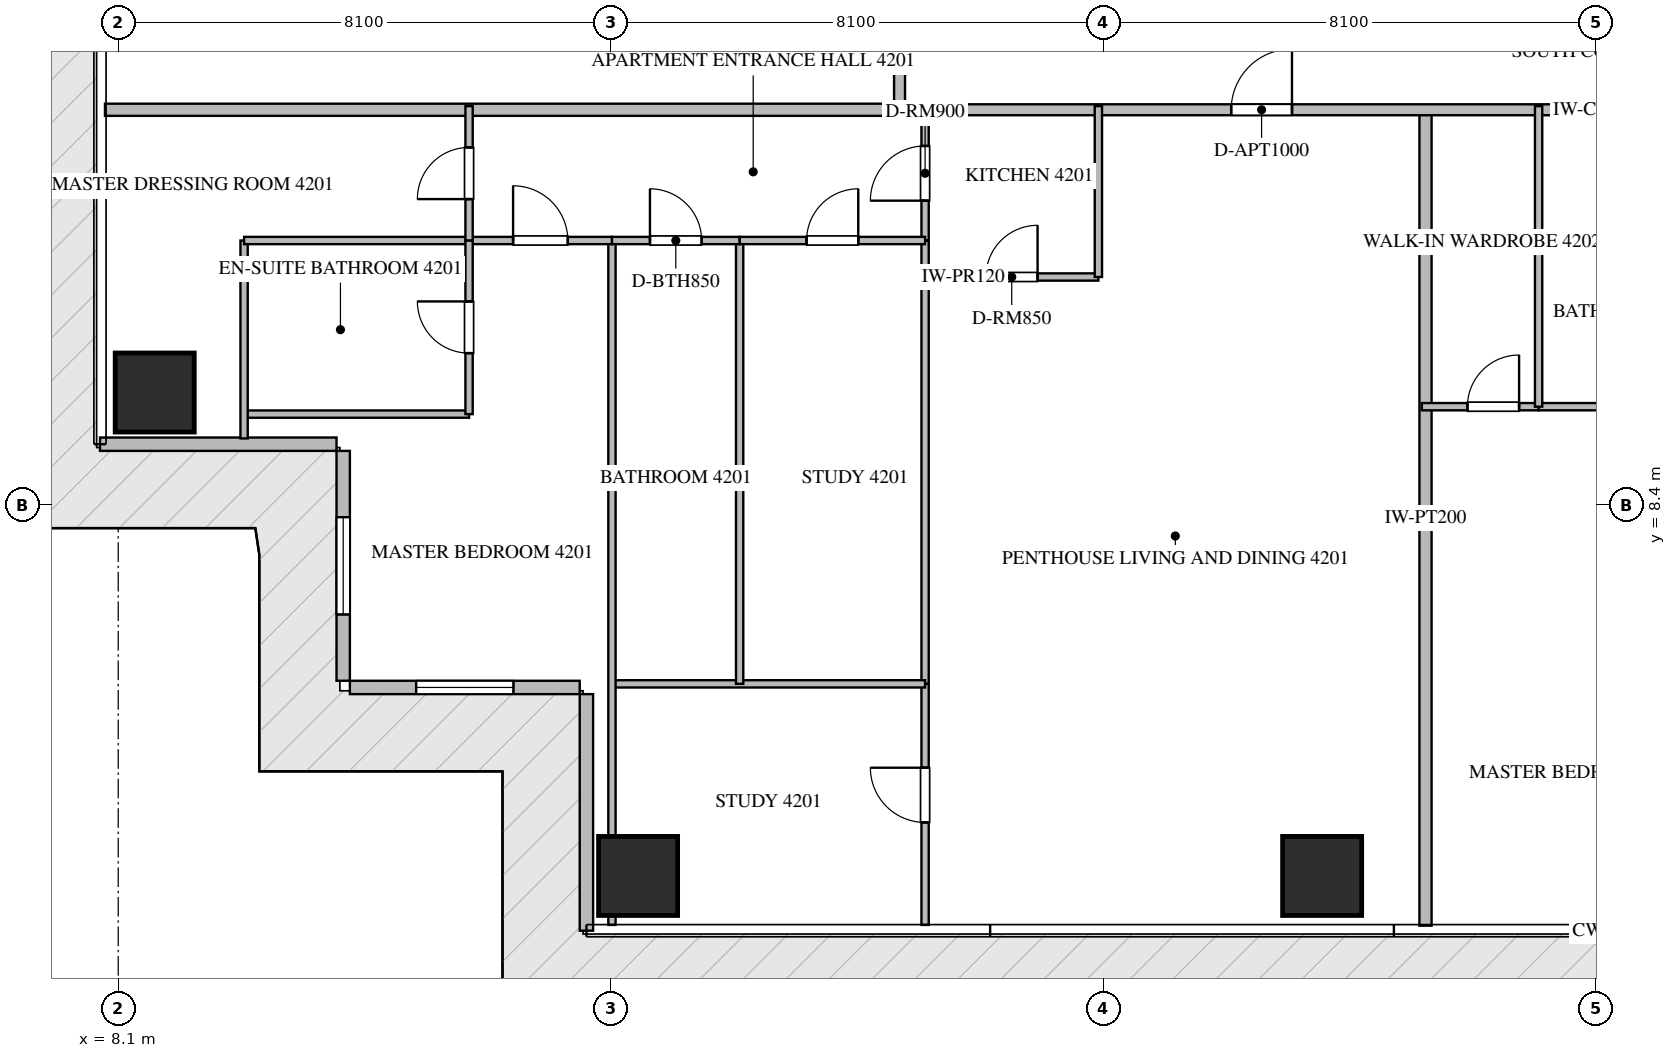
"""IFC4 building model, lengths in metres.
Left out: names, types, materials, properties, quantities, classifications, styles, units other than length and angle.
Written with IfcOpenShell. Run it as: python <this file> out.ifc"""

import sys

from ifc_helpers import new_model, si_unit, direction, frame, frame_2d, origin, origin_2d, place, context, subcontext, project, spatial, rectangle, extrude, source, transform, mapped, element, fill, save


model = new_model("IFC4")
c1 = context("Model", 3, precision=1e-05, world=origin(), true_north=direction((0.0, 1.0)))
c2 = subcontext(c1, "Body", "Model", "MODEL_VIEW")
j1 = project(units=[si_unit("LENGTHUNIT", "METRE"), si_unit("PLANEANGLEUNIT", "RADIAN")], contexts=[c1])
p1 = place(None, origin())
s1 = spatial("IfcSite", under=j1, at=p1, CompositionType="ELEMENT")
p2 = place(p1, origin())
s2 = spatial("IfcBuilding", under=s1, at=p2, CompositionType="ELEMENT")
p3 = place(p2, frame((0.0, 0.0, 168.9)))
s3 = spatial("IfcBuildingStorey", under=s2, at=p3, CompositionType="ELEMENT", Elevation=168.9)
m1 = source(origin(), c2, "Body", "SweptSolid", [
    extrude(rectangle(XDim=1.3, YDim=1.3, at=origin_2d()), origin(), (0.0, 0.0, 1.0), 3.75),
])
for number, where, z_axis, x_axis in (
    (1, (16.65, 2.3, -0.26), (0.0, 0.0, 1.0), (1.0, 0.0, 0.0)),
    (2, (27.9, 2.3, -0.26), (0.0, 0.0, 1.0), (1.0, 0.0, 0.0)),
    (3, (8.7, 10.25, -0.26), (0.0, 0.0, 1.0), (1.0, 0.0, 0.0)),
):
    element("IfcColumn", number, at=place(p3, frame(where, z_axis=z_axis, x_axis=x_axis)), inside=s3, PredefinedType="COLUMN", context=c2, shape_type="MappedRepresentation", body=[
        mapped(m1, transform((0.0, 0.0, 0.0), scale=1.0)),
    ])
p4 = place(p3, frame((7.8, 9.4, 0.0), z_axis=(0.0, 0.0, 1.0), x_axis=(1.0, 0.0, 0.0)))
e4 = element("IfcWall", 4, at=p4, inside=s3, PredefinedType="ELEMENTEDWALL", context=c2, shape_type="SweptSolid", body=[
    extrude(rectangle(XDim=3.89, YDim=0.22, at=frame_2d((1.945, 0.0))), origin(), (0.0, 0.0, 1.0), 3.475),
])
p5 = place(p3, frame((11.8, 9.29, 0.0), z_axis=(0.0, 0.0, 1.0), x_axis=(0.0, -1.0, 0.0)))
e5 = element("IfcWall", 5, at=p5, inside=s3, PredefinedType="ELEMENTEDWALL", context=c2, shape_type="SweptSolid", body=[
    extrude(rectangle(XDim=3.78, YDim=0.22, at=frame_2d((1.89, 0.0))), origin(), (0.0, 0.0, 1.0), 3.475),
])
p6 = place(p5, frame((1.09, 0.0, 0.65)))
e6 = element("IfcOpeningElement", 6, at=p6, cuts=e5, PredefinedType="OPENING", context=c2, shape_type="SweptSolid", body=[
    extrude(rectangle(XDim=1.6, YDim=2.1, at=frame_2d((0.8, 1.05))), frame((0.0, 0.12, 0.0), z_axis=(0.0, -1.0, 0.0), x_axis=(1.0, 0.0, 0.0)), (0.0, 0.0, 1.0), 0.24),
])
p7 = place(p3, frame((11.91, 5.4, 0.0), z_axis=(0.0, 0.0, 1.0), x_axis=(1.0, 0.0, 0.0)))
e7 = element("IfcWall", 7, at=p7, inside=s3, PredefinedType="ELEMENTEDWALL", context=c2, shape_type="SweptSolid", body=[
    extrude(rectangle(XDim=3.78, YDim=0.22, at=frame_2d((1.89, 0.0))), origin(), (0.0, 0.0, 1.0), 3.475),
])
p8 = place(p7, frame((1.09, 0.0, 0.65)))
e8 = element("IfcOpeningElement", 8, at=p8, cuts=e7, PredefinedType="OPENING", context=c2, shape_type="SweptSolid", body=[
    extrude(rectangle(XDim=1.6, YDim=2.1, at=frame_2d((0.8, 1.05))), frame((0.0, 0.12, 0.0), z_axis=(0.0, -1.0, 0.0), x_axis=(1.0, 0.0, 0.0)), (0.0, 0.0, 1.0), 0.24),
])
p9 = place(p3, frame((15.8, 5.29, 0.0), z_axis=(0.0, 0.0, 1.0), x_axis=(0.0, -1.0, 0.0)))
e9 = element("IfcWall", 9, at=p9, inside=s3, PredefinedType="ELEMENTEDWALL", context=c2, shape_type="SweptSolid", body=[
    extrude(rectangle(XDim=3.89, YDim=0.22, at=frame_2d((1.945, 0.0))), origin(), (0.0, 0.0, 1.0), 3.475),
])
p10 = place(p3, frame((29.6, 1.482, 0.0), z_axis=(0.0, 0.0, 1.0), x_axis=(0.0, 1.0, 0.0)))
e10 = element("IfcWall", 10, at=p10, inside=s3, PredefinedType="PARTITIONING", context=c2, shape_type="SweptSolid", body=[
    extrude(rectangle(XDim=13.418, YDim=0.2, at=frame_2d((6.709, 0.0))), origin(), (0.0, 0.0, 1.0), 3.49),
])
p11 = place(p3, frame((7.882, 14.9, 0.0), z_axis=(0.0, 0.0, 1.0), x_axis=(1.0, 0.0, 0.0)))
e11 = element("IfcWall", 11, at=p11, inside=s3, PredefinedType="PARTITIONING", context=c2, shape_type="SweptSolid", body=[
    extrude(rectangle(XDim=13.068, YDim=0.2, at=frame_2d((6.534, 0.0))), origin(), (0.0, 0.0, 1.0), 3.49),
])
p12 = place(p3, frame((20.952, 14.9, 0.0), z_axis=(0.0, 0.0, 1.0), x_axis=(1.0, 0.0, 0.0)))
e12 = element("IfcWall", 12, at=p12, inside=s3, PredefinedType="PARTITIONING", context=c2, shape_type="SweptSolid", body=[
    extrude(rectangle(XDim=22.896, YDim=0.18, at=frame_2d((11.448, 0.0))), origin(), (0.0, 0.0, 1.0), 3.49),
])
p13 = place(p12, frame((5.452, 0.0, 0.0)))
e13 = element("IfcOpeningElement", 13, at=p13, cuts=e12, PredefinedType="OPENING", context=c2, shape_type="SweptSolid", body=[
    extrude(rectangle(XDim=1.0, YDim=2.15, at=frame_2d((0.5, 1.075))), frame((0.0, 0.1, 0.0), z_axis=(0.0, -1.0, 0.0), x_axis=(1.0, 0.0, 0.0)), (0.0, 0.0, 1.0), 0.2),
])
p14 = place(p12, frame((19.378, 0.0, 0.0)))
e14 = element("IfcOpeningElement", 14, at=p14, cuts=e12, PredefinedType="OPENING", context=c2, shape_type="SweptSolid", body=[
    extrude(rectangle(XDim=1.0, YDim=2.15, at=frame_2d((0.5, 1.075))), frame((0.0, 0.1, 0.0), z_axis=(0.0, -1.0, 0.0), x_axis=(1.0, 0.0, 0.0)), (0.0, 0.0, 1.0), 0.2),
])
p15 = place(p3, frame((20.95, 14.9, 0.0), z_axis=(0.0, 0.0, 1.0), x_axis=(0.0, 1.0, 0.0)))
e15 = element("IfcWall", 15, at=p15, inside=s3, PredefinedType="PARTITIONING", context=c2, shape_type="SweptSolid", body=[
    extrude(rectangle(XDim=18.7, YDim=0.18, at=frame_2d((9.35, 0.0))), origin(), (0.0, 0.0, 1.0), 3.49),
])
p16 = place(p15, frame((1.805, 0.0, 0.0)))
e16 = element("IfcOpeningElement", 16, at=p16, cuts=e15, PredefinedType="OPENING", context=c2, shape_type="SweptSolid", body=[
    extrude(rectangle(XDim=1.0, YDim=2.15, at=frame_2d((0.5, 1.075))), frame((0.0, 0.1, 0.0), z_axis=(0.0, -1.0, 0.0), x_axis=(1.0, 0.0, 0.0)), (0.0, 0.0, 1.0), 0.2),
])
p17 = place(p3, frame((21.37, 12.15, 0.0), z_axis=(0.0, 0.0, 1.0), x_axis=(1.0, 0.0, 0.0)))
e17 = element("IfcWall", 17, at=p17, inside=s3, PredefinedType="PARTITIONING", context=c2, shape_type="SweptSolid", body=[
    extrude(rectangle(XDim=2.85, YDim=0.12, at=frame_2d((1.425, 0.0))), origin(), (0.0, 0.0, 1.0), 3.49),
])
p18 = place(p17, frame((1.0, 0.0, 0.0)))
e18 = element("IfcOpeningElement", 18, at=p18, cuts=e17, PredefinedType="OPENING", context=c2, shape_type="SweptSolid", body=[
    extrude(rectangle(XDim=0.85, YDim=2.1, at=frame_2d((0.425, 1.05))), frame((0.0, 0.07, 0.0), z_axis=(0.0, -1.0, 0.0), x_axis=(1.0, 0.0, 0.0)), (0.0, 0.0, 1.0), 0.14),
])
p19 = place(p3, frame((24.22, 12.15, 0.0), z_axis=(0.0, 0.0, 1.0), x_axis=(0.0, 1.0, 0.0)))
e19 = element("IfcWall", 19, at=p19, inside=s3, PredefinedType="PARTITIONING", context=c2, shape_type="SweptSolid", body=[
    extrude(rectangle(XDim=2.81, YDim=0.12, at=frame_2d((1.405, 0.0))), origin(), (0.0, 0.0, 1.0), 3.49),
])
p20 = place(p3, frame((21.37, 12.75, 0.0), z_axis=(0.0, 0.0, 1.0), x_axis=(0.0, 1.0, 0.0)))
e20 = element("IfcWall", 20, at=p20, inside=s3, PredefinedType="PARTITIONING", context=c2, shape_type="SweptSolid", body=[
    extrude(rectangle(XDim=2.21, YDim=0.12, at=frame_2d((1.105, 0.0))), origin(), (0.0, 0.0, 1.0), 3.49),
])
p21 = place(p20, frame((0.655, 0.0, 0.0)))
e21 = element("IfcOpeningElement", 21, at=p21, cuts=e20, PredefinedType="OPENING", context=c2, shape_type="SweptSolid", body=[
    extrude(rectangle(XDim=0.9, YDim=2.1, at=frame_2d((0.45, 1.05))), frame((0.0, 0.07, 0.0), z_axis=(0.0, -1.0, 0.0), x_axis=(1.0, 0.0, 0.0)), (0.0, 0.0, 1.0), 0.14),
])
p22 = place(p3, frame((21.37, 1.495, 0.0), z_axis=(0.0, 0.0, 1.0), x_axis=(0.0, 1.0, 0.0)))
e22 = element("IfcWall", 22, at=p22, inside=s3, PredefinedType="PARTITIONING", context=c2, shape_type="SweptSolid", body=[
    extrude(rectangle(XDim=3.964, YDim=0.12, at=frame_2d((1.982, 0.0))), origin(), (0.0, 0.0, 1.0), 3.49),
])
p23 = place(p22, frame((1.685, 0.0, 0.0)))
e23 = element("IfcOpeningElement", 23, at=p23, cuts=e22, PredefinedType="OPENING", context=c2, shape_type="SweptSolid", body=[
    extrude(rectangle(XDim=0.9, YDim=2.1, at=frame_2d((0.45, 1.05))), frame((0.0, 0.07, 0.0), z_axis=(0.0, -1.0, 0.0), x_axis=(1.0, 0.0, 0.0)), (0.0, 0.0, 1.0), 0.14),
])
p24 = place(p3, frame((21.37, 5.461, 0.0), z_axis=(0.0, 0.0, 1.0), x_axis=(0.0, 1.0, 0.0)))
e24 = element("IfcWall", 24, at=p24, inside=s3, PredefinedType="PARTITIONING", context=c2, shape_type="SweptSolid", body=[
    extrude(rectangle(XDim=7.287, YDim=0.12, at=frame_2d((3.644, 0.0))), origin(), (0.0, 0.0, 1.0), 3.49),
])
p25 = place(p3, frame((16.22, 5.459, 0.0), z_axis=(0.0, 0.0, 1.0), x_axis=(1.0, 0.0, 0.0)))
e25 = element("IfcWall", 25, at=p25, inside=s3, PredefinedType="PARTITIONING", context=c2, shape_type="SweptSolid", body=[
    extrude(rectangle(XDim=5.15, YDim=0.12, at=frame_2d((2.575, 0.0))), origin(), (0.0, 0.0, 1.0), 3.49),
])
p26 = place(p3, frame((16.22, 1.495, 0.0), z_axis=(0.0, 0.0, 1.0), x_axis=(0.0, 1.0, 0.0)))
e26 = element("IfcWall", 26, at=p26, inside=s3, PredefinedType="PARTITIONING", context=c2, shape_type="SweptSolid", body=[
    extrude(rectangle(XDim=11.255, YDim=0.12, at=frame_2d((5.627, 0.0))), origin(), (0.0, 0.0, 1.0), 3.49),
])
p27 = place(p3, frame((18.32, 5.459, 0.0), z_axis=(0.0, 0.0, 1.0), x_axis=(0.0, 1.0, 0.0)))
e27 = element("IfcWall", 27, at=p27, inside=s3, PredefinedType="PARTITIONING", context=c2, shape_type="SweptSolid", body=[
    extrude(rectangle(XDim=7.291, YDim=0.12, at=frame_2d((3.646, 0.0))), origin(), (0.0, 0.0, 1.0), 3.49),
])
p28 = place(p3, frame((16.22, 12.75, 0.0), z_axis=(0.0, 0.0, 1.0), x_axis=(1.0, 0.0, 0.0)))
e28 = element("IfcWall", 28, at=p28, inside=s3, PredefinedType="PARTITIONING", context=c2, shape_type="SweptSolid", body=[
    extrude(rectangle(XDim=2.1, YDim=0.12, at=frame_2d((1.05, 0.0))), origin(), (0.0, 0.0, 1.0), 3.49),
])
p29 = place(p28, frame((0.625, 0.0, 0.0)))
e29 = element("IfcOpeningElement", 29, at=p29, cuts=e28, PredefinedType="OPENING", context=c2, shape_type="SweptSolid", body=[
    extrude(rectangle(XDim=0.85, YDim=2.1, at=frame_2d((0.425, 1.05))), frame((0.0, 0.07, 0.0), z_axis=(0.0, -1.0, 0.0), x_axis=(1.0, 0.0, 0.0)), (0.0, 0.0, 1.0), 0.14),
])
p30 = place(p3, frame((18.322, 12.75, 0.0), z_axis=(0.0, 0.0, 1.0), x_axis=(1.0, 0.0, 0.0)))
e30 = element("IfcWall", 30, at=p30, inside=s3, PredefinedType="PARTITIONING", context=c2, shape_type="SweptSolid", body=[
    extrude(rectangle(XDim=3.048, YDim=0.12, at=frame_2d((1.524, 0.0))), origin(), (0.0, 0.0, 1.0), 3.49),
])
p31 = place(p30, frame((1.099, 0.0, 0.0)))
e31 = element("IfcOpeningElement", 31, at=p31, cuts=e30, PredefinedType="OPENING", context=c2, shape_type="SweptSolid", body=[
    extrude(rectangle(XDim=0.85, YDim=2.1, at=frame_2d((0.425, 1.05))), frame((0.0, 0.07, 0.0), z_axis=(0.0, -1.0, 0.0), x_axis=(1.0, 0.0, 0.0)), (0.0, 0.0, 1.0), 0.14),
])
p32 = place(p3, frame((13.87, 12.75, 0.0), z_axis=(0.0, 0.0, 1.0), x_axis=(1.0, 0.0, 0.0)))
e32 = element("IfcWall", 32, at=p32, inside=s3, PredefinedType="PARTITIONING", context=c2, shape_type="SweptSolid", body=[
    extrude(rectangle(XDim=2.348, YDim=0.12, at=frame_2d((1.174, 0.0))), origin(), (0.0, 0.0, 1.0), 3.49),
])
p33 = place(p32, frame((0.724, 0.0, 0.0)))
e33 = element("IfcOpeningElement", 33, at=p33, cuts=e32, PredefinedType="OPENING", context=c2, shape_type="SweptSolid", body=[
    extrude(rectangle(XDim=0.9, YDim=2.1, at=frame_2d((0.45, 1.05))), frame((0.0, 0.07, 0.0), z_axis=(0.0, -1.0, 0.0), x_axis=(1.0, 0.0, 0.0)), (0.0, 0.0, 1.0), 0.14),
])
p34 = place(p3, frame((10.17, 9.895, 0.0), z_axis=(0.0, 0.0, 1.0), x_axis=(1.0, 0.0, 0.0)))
e34 = element("IfcWall", 34, at=p34, inside=s3, PredefinedType="PARTITIONING", context=c2, shape_type="SweptSolid", body=[
    extrude(rectangle(XDim=3.7, YDim=0.12, at=frame_2d((1.85, 0.0))), origin(), (0.0, 0.0, 1.0), 3.49),
])
p35 = place(p3, frame((10.17, 9.495, 0.0), z_axis=(0.0, 0.0, 1.0), x_axis=(0.0, 1.0, 0.0)))
e35 = element("IfcWall", 35, at=p35, inside=s3, PredefinedType="PARTITIONING", context=c2, shape_type="SweptSolid", body=[
    extrude(rectangle(XDim=3.255, YDim=0.12, at=frame_2d((1.627, 0.0))), origin(), (0.0, 0.0, 1.0), 3.49),
])
p36 = place(p3, frame((10.17, 12.75, 0.0), z_axis=(0.0, 0.0, 1.0), x_axis=(1.0, 0.0, 0.0)))
e36 = element("IfcWall", 36, at=p36, inside=s3, PredefinedType="PARTITIONING", context=c2, shape_type="SweptSolid", body=[
    extrude(rectangle(XDim=3.698, YDim=0.12, at=frame_2d((1.849, 0.0))), origin(), (0.0, 0.0, 1.0), 3.49),
])
p37 = place(p3, frame((13.87, 9.895, 0.0), z_axis=(0.0, 0.0, 1.0), x_axis=(0.0, 1.0, 0.0)))
e37 = element("IfcWall", 37, at=p37, inside=s3, PredefinedType="PARTITIONING", context=c2, shape_type="SweptSolid", body=[
    extrude(rectangle(XDim=2.855, YDim=0.12, at=frame_2d((1.427, 0.0))), origin(), (0.0, 0.0, 1.0), 3.49),
])
p38 = place(p37, frame((1.003, 0.0, 0.0)))
e38 = element("IfcOpeningElement", 38, at=p38, cuts=e37, PredefinedType="OPENING", context=c2, shape_type="SweptSolid", body=[
    extrude(rectangle(XDim=0.85, YDim=2.1, at=frame_2d((0.425, 1.05))), frame((0.0, 0.07, 0.0), z_axis=(0.0, -1.0, 0.0), x_axis=(1.0, 0.0, 0.0)), (0.0, 0.0, 1.0), 0.14),
])
p39 = place(p3, frame((13.87, 12.752, 0.0), z_axis=(0.0, 0.0, 1.0), x_axis=(0.0, 1.0, 0.0)))
e39 = element("IfcWall", 39, at=p39, inside=s3, PredefinedType="PARTITIONING", context=c2, shape_type="SweptSolid", body=[
    extrude(rectangle(XDim=2.208, YDim=0.12, at=frame_2d((1.104, 0.0))), origin(), (0.0, 0.0, 1.0), 3.49),
])
p40 = place(p39, frame((0.679, 0.0, 0.0)))
e40 = element("IfcOpeningElement", 40, at=p40, cuts=e39, PredefinedType="OPENING", context=c2, shape_type="SweptSolid", body=[
    extrude(rectangle(XDim=0.85, YDim=2.1, at=frame_2d((0.425, 1.05))), frame((0.0, 0.07, 0.0), z_axis=(0.0, -1.0, 0.0), x_axis=(1.0, 0.0, 0.0)), (0.0, 0.0, 1.0), 0.14),
])
p41 = place(p3, frame((29.54, 10.017, 0.0), z_axis=(0.0, 0.0, 1.0), x_axis=(1.0, 0.0, 0.0)))
e41 = element("IfcWall", 41, at=p41, inside=s3, PredefinedType="PARTITIONING", context=c2, shape_type="SweptSolid", body=[
    extrude(rectangle(XDim=1.92, YDim=0.12, at=frame_2d((0.96, 0.0))), origin(), (0.0, 0.0, 1.0), 3.49),
])
p42 = place(p41, frame((0.749, 0.0, 0.0)))
e42 = element("IfcOpeningElement", 42, at=p42, cuts=e41, PredefinedType="OPENING", context=c2, shape_type="SweptSolid", body=[
    extrude(rectangle(XDim=0.85, YDim=2.1, at=frame_2d((0.425, 1.05))), frame((0.0, 0.07, 0.0), z_axis=(0.0, -1.0, 0.0), x_axis=(1.0, 0.0, 0.0)), (0.0, 0.0, 1.0), 0.14),
])
p43 = place(p3, frame((31.462, 10.017, 0.0), z_axis=(0.0, 0.0, 1.0), x_axis=(1.0, 0.0, 0.0)))
e43 = element("IfcWall", 43, at=p43, inside=s3, PredefinedType="PARTITIONING", context=c2, shape_type="SweptSolid", body=[
    extrude(rectangle(XDim=3.098, YDim=0.12, at=frame_2d((1.549, 0.0))), origin(), (0.0, 0.0, 1.0), 3.49),
])
p44 = place(p3, frame((31.46, 10.017, 0.0), z_axis=(0.0, 0.0, 1.0), x_axis=(0.0, 1.0, 0.0)))
e44 = element("IfcWall", 44, at=p44, inside=s3, PredefinedType="PARTITIONING", context=c2, shape_type="SweptSolid", body=[
    extrude(rectangle(XDim=4.943, YDim=0.12, at=frame_2d((2.471, 0.0))), origin(), (0.0, 0.0, 1.0), 3.49),
])
m2 = source(origin(), c2, "Body", "SweptSolid", [
    extrude(rectangle(XDim=1.6, YDim=2.1, at=frame_2d((0.8, 1.05))), frame((0.0, 0.03, 0.0), z_axis=(0.0, -1.0, 0.0), x_axis=(1.0, 0.0, 0.0)), (0.0, 0.0, 1.0), 0.06),
])
p45 = place(p6, origin())
e45 = element("IfcWindow", 45, at=p45, inside=s3, PartitioningType="SINGLE_PANEL", PredefinedType="WINDOW", context=c2, shape_type="MappedRepresentation", body=[
    mapped(m2, transform((0.0, 0.0, 0.0), scale=1.0)),
])
fill(e6, e45)
p46 = place(p8, origin())
e46 = element("IfcWindow", 46, at=p46, inside=s3, PartitioningType="SINGLE_PANEL", PredefinedType="WINDOW", context=c2, shape_type="MappedRepresentation", body=[
    mapped(m2, transform((0.0, 0.0, 0.0), scale=1.0)),
])
fill(e8, e46)
m3 = source(origin(), c2, "Body", "SweptSolid", [
    extrude(rectangle(XDim=1.0, YDim=2.15, at=frame_2d((0.5, 1.075))), frame((0.0, 0.025, 0.0), z_axis=(0.0, -1.0, 0.0), x_axis=(1.0, 0.0, 0.0)), (0.0, 0.0, 1.0), 0.05),
])
p47 = place(p13, origin())
e47 = element("IfcDoor", 47, at=p47, inside=s3, OperationType="SINGLE_SWING_RIGHT", PredefinedType="DOOR", context=c2, shape_type="MappedRepresentation", body=[
    mapped(m3, transform((0.0, 0.0, 0.0), scale=1.0)),
])
fill(e13, e47)
m4 = source(origin(), c2, "Body", "SweptSolid", [
    extrude(rectangle(XDim=0.85, YDim=2.1, at=frame_2d((0.425, 1.05))), frame((0.0, 0.025, 0.0), z_axis=(0.0, -1.0, 0.0), x_axis=(1.0, 0.0, 0.0)), (0.0, 0.0, 1.0), 0.05),
])
p48 = place(p18, origin())
e48 = element("IfcDoor", 48, at=p48, inside=s3, OperationType="SINGLE_SWING_RIGHT", PredefinedType="DOOR", context=c2, shape_type="MappedRepresentation", body=[
    mapped(m4, transform((0.0, 0.0, 0.0), scale=1.0)),
])
fill(e18, e48)
m5 = source(origin(), c2, "Body", "SweptSolid", [
    extrude(rectangle(XDim=0.9, YDim=2.1, at=frame_2d((0.45, 1.05))), frame((0.0, 0.025, 0.0), z_axis=(0.0, -1.0, 0.0), x_axis=(1.0, 0.0, 0.0)), (0.0, 0.0, 1.0), 0.05),
])
p49 = place(p21, origin())
e49 = element("IfcDoor", 49, at=p49, inside=s3, OperationType="SINGLE_SWING_LEFT", PredefinedType="DOOR", context=c2, shape_type="MappedRepresentation", body=[
    mapped(m5, transform((0.0, 0.0, 0.0), scale=1.0)),
])
fill(e21, e49)
p50 = place(p23, origin())
e50 = element("IfcDoor", 50, at=p50, inside=s3, OperationType="SINGLE_SWING_RIGHT", PredefinedType="DOOR", context=c2, shape_type="MappedRepresentation", body=[
    mapped(m5, transform((0.0, 0.0, 0.0), scale=1.0)),
])
fill(e23, e50)
p51 = place(p29, origin())
e51 = element("IfcDoor", 51, at=p51, inside=s3, OperationType="SINGLE_SWING_LEFT", PredefinedType="DOOR", context=c2, shape_type="MappedRepresentation", body=[
    mapped(m4, transform((0.0, 0.0, 0.0), scale=1.0)),
])
fill(e29, e51)
p52 = place(p31, origin())
e52 = element("IfcDoor", 52, at=p52, inside=s3, OperationType="SINGLE_SWING_RIGHT", PredefinedType="DOOR", context=c2, shape_type="MappedRepresentation", body=[
    mapped(m4, transform((0.0, 0.0, 0.0), scale=1.0)),
])
fill(e31, e52)
p53 = place(p33, origin())
e53 = element("IfcDoor", 53, at=p53, inside=s3, OperationType="SINGLE_SWING_LEFT", PredefinedType="DOOR", context=c2, shape_type="MappedRepresentation", body=[
    mapped(m5, transform((0.0, 0.0, 0.0), scale=1.0)),
])
fill(e33, e53)
p54 = place(p38, origin())
e54 = element("IfcDoor", 54, at=p54, inside=s3, OperationType="SINGLE_SWING_RIGHT", PredefinedType="DOOR", context=c2, shape_type="MappedRepresentation", body=[
    mapped(m4, transform((0.0, 0.0, 0.0), scale=1.0)),
])
fill(e38, e54)
p55 = place(p40, origin())
e55 = element("IfcDoor", 55, at=p55, inside=s3, OperationType="SINGLE_SWING_LEFT", PredefinedType="DOOR", context=c2, shape_type="MappedRepresentation", body=[
    mapped(m4, transform((0.0, 0.0, 0.0), scale=1.0)),
])
fill(e40, e55)
p56 = place(p42, origin())
e56 = element("IfcDoor", 56, at=p56, inside=s3, OperationType="SINGLE_SWING_RIGHT", PredefinedType="DOOR", context=c2, shape_type="MappedRepresentation", body=[
    mapped(m4, transform((0.0, 0.0, 0.0), scale=1.0)),
])
fill(e42, e56)
save(model, sys.argv[1])
